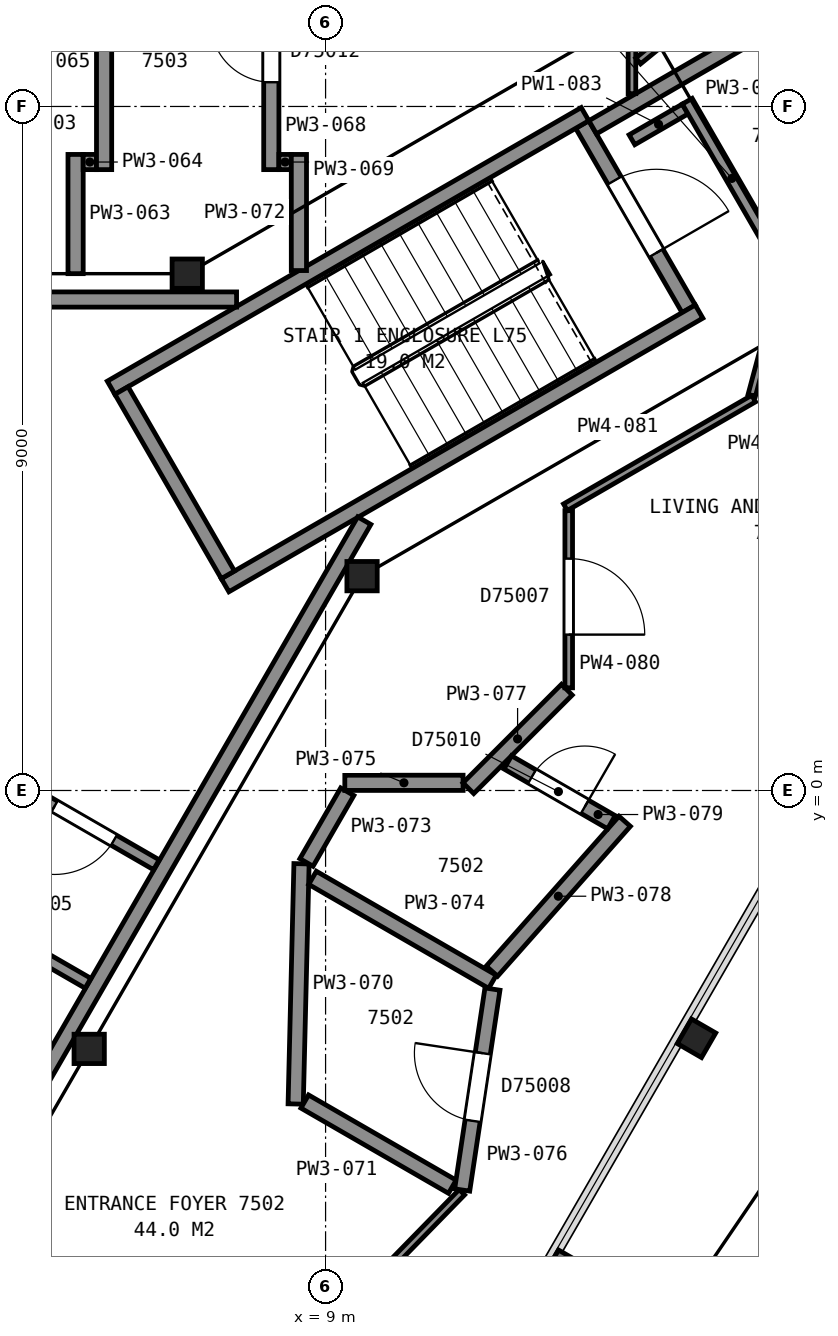
"""IFC4 building model, lengths in metres.
Left out: names, types, materials, properties, quantities, classifications, styles, units other than length and angle.
Written with IfcOpenShell. Run it as: python <this file> out.ifc"""

import sys

from ifc_helpers import new_model, si_unit, direction, frame, frame_2d, origin, origin_2d, place, context, subcontext, project, spatial, rectangle, i_section, extrude, element, fill, save


model = new_model("IFC4")
c1 = context("Model", 3, precision=1e-05, world=origin(), true_north=direction((0.0, 1.0)))
c2 = subcontext(c1, "Body", "Model", "MODEL_VIEW")
j1 = project(units=[si_unit("LENGTHUNIT", "METRE"), si_unit("PLANEANGLEUNIT", "RADIAN")], contexts=[c1])
p1 = place(None, origin())
s1 = spatial("IfcSite", under=j1, at=p1, CompositionType="ELEMENT")
p2 = place(p1, origin())
s2 = spatial("IfcBuilding", under=s1, at=p2, CompositionType="ELEMENT")
p3 = place(p2, frame((0.0, 0.0, 297.3)))
s3 = spatial("IfcBuildingStorey", under=s2, at=p3, CompositionType="ELEMENT", Elevation=297.3)
p4 = place(p3, frame((13.88, -3.26, 0.0), z_axis=(0.0, 0.0, 1.0), x_axis=(-0.5, -0.866025403784, 0.0)))
e1 = element("IfcColumn", 1, at=p4, inside=s3, PredefinedType="COLUMN", context=c2, shape_type="SweptSolid", body=[
    extrude(i_section(OverallWidth=0.373, OverallDepth=0.368, WebThickness=0.015, FlangeThickness=0.024, FilletRadius=0.015, at=origin_2d()), origin(), (0.0, 0.0, 1.0), 3.7),
])
for number, where, z_axis, x_axis in (
    (2, (9.48, 2.82, 0.0), (0.0, 0.0, 1.0), (1.0, 0.0, 0.0)),
    (3, (7.18, 6.8, 0.0), (0.0, 0.0, 1.0), (1.0, 0.0, 0.0)),
    (4, (5.89, -3.4, 0.0), (0.0, 0.0, 1.0), (1.0, 0.0, 0.0)),
):
    element("IfcColumn", number, at=place(p3, frame(where, z_axis=z_axis, x_axis=x_axis)), inside=s3, PredefinedType="COLUMN", context=c2, shape_type="SweptSolid", body=[
        extrude(i_section(OverallWidth=0.399, OverallDepth=0.386, WebThickness=0.021, FlangeThickness=0.033, FilletRadius=0.015, at=origin_2d()), origin(), (0.0, 0.0, 1.0), 3.7),
    ])
p5 = place(p3, frame((13.777, 6.338, 0.0), z_axis=(0.0, 0.0, 1.0), x_axis=(-0.500049511043, 0.865996816683, 0.0)))
e5 = element("IfcWall", 5, at=p5, inside=s3, PredefinedType="PARTITIONING", context=c2, shape_type="SweptSolid", body=[
    extrude(rectangle(XDim=2.8, YDim=0.2, at=frame_2d((1.4, 0.0))), origin(), (0.0, 0.0, 1.0), 3.45),
])
p6 = place(p5, frame((0.85, 0.0, 0.0)))
e6 = element("IfcOpeningElement", 6, at=p6, cuts=e5, PredefinedType="OPENING", context=c2, shape_type="SweptSolid", body=[
    extrude(rectangle(XDim=1.1, YDim=2.1, at=frame_2d((0.55, 1.05))), frame((0.0, 0.11, 0.0), z_axis=(0.0, -1.0, 0.0), x_axis=(1.0, 0.0, 0.0)), (0.0, 0.0, 1.0), 0.22),
])
for number, where, z_axis, x_axis in (
    (7, (6.178, 5.299, 0.0), (0.0, 0.0, 1.0), (0.866, 0.5, 0.0)),
    (8, (7.678, 2.701, 0.0), (0.0, 0.0, 1.0), (0.866, 0.5, 0.0)),
):
    element("IfcWall", number, at=place(p3, frame(where, z_axis=z_axis, x_axis=x_axis)), inside=s3, PredefinedType="PARTITIONING", context=c2, shape_type="SweptSolid", body=[
        extrude(rectangle(XDim=7.2, YDim=0.2, at=frame_2d((3.6, 0.0))), origin(), (0.0, 0.0, 1.0), 3.45),
    ])
p7 = place(p3, frame((7.715, 2.838, 0.0), z_axis=(0.0, 0.0, 1.0), x_axis=(-0.500049511043, 0.865996816683, 0.0)))
e9 = element("IfcWall", 9, at=p7, inside=s3, PredefinedType="PARTITIONING", context=c2, shape_type="SweptSolid", body=[
    extrude(rectangle(XDim=2.8, YDim=0.2, at=frame_2d((1.4, 0.0))), origin(), (0.0, 0.0, 1.0), 3.45),
])
p8 = place(p3, frame((7.829, 6.46, 0.0), z_axis=(0.0, 0.0, 1.0), x_axis=(-1.0, 0.0, 0.0)))
e10 = element("IfcWall", 10, at=p8, inside=s3, PredefinedType="PARTITIONING", context=c2, shape_type="SweptSolid", body=[
    extrude(rectangle(XDim=15.658, YDim=0.2, at=frame_2d((7.829, 0.0))), origin(), (0.0, 0.0, 1.0), 3.45),
])
p9 = place(p8, frame((12.168, 0.0, 0.0)))
e11 = element("IfcOpeningElement", 11, at=p9, cuts=e10, PredefinedType="OPENING", context=c2, shape_type="SweptSolid", body=[
    extrude(rectangle(XDim=1.2, YDim=2.1, at=frame_2d((0.6, 1.05))), frame((0.0, 0.11, 0.0), z_axis=(0.0, -1.0, 0.0), x_axis=(1.0, 0.0, 0.0)), (0.0, 0.0, 1.0), 0.22),
])
p10 = place(p3, frame((3.828, -6.29, 0.0), z_axis=(0.0, 0.0, 1.0), x_axis=(0.499979739078, 0.866037101117, 0.0)))
e12 = element("IfcWall", 12, at=p10, inside=s3, PredefinedType="PARTITIONING", context=c2, shape_type="SweptSolid", body=[
    extrude(rectangle(XDim=11.363, YDim=0.2, at=frame_2d((5.681, 0.0))), origin(), (0.0, 0.0, 1.0), 3.45),
])
p11 = place(p10, frame((0.55, 0.0, 0.0)))
e13 = element("IfcOpeningElement", 13, at=p11, cuts=e12, PredefinedType="OPENING", context=c2, shape_type="SweptSolid", body=[
    extrude(rectangle(XDim=1.2, YDim=2.1, at=frame_2d((0.6, 1.05))), frame((0.0, 0.11, 0.0), z_axis=(0.0, -1.0, 0.0), x_axis=(1.0, 0.0, 0.0)), (0.0, 0.0, 1.0), 0.22),
])
p12 = place(p3, frame((3.951, -1.427, 0.0), z_axis=(0.0, 0.0, 1.0), x_axis=(0.866062920605, -0.499935013329, 0.0)))
e14 = element("IfcWall", 14, at=p12, inside=s3, PredefinedType="PARTITIONING", context=c2, shape_type="SweptSolid", body=[
    extrude(rectangle(XDim=2.22, YDim=0.15, at=frame_2d((1.11, 0.0))), origin(), (0.0, 0.0, 1.0), 3.45),
])
p13 = place(p3, frame((6.774, -0.978, 0.0), z_axis=(0.0, 0.0, 1.0), x_axis=(-0.866062920605, 0.499935013329, 0.0)))
e15 = element("IfcWall", 15, at=p13, inside=s3, PredefinedType="PARTITIONING", context=c2, shape_type="SweptSolid", body=[
    extrude(rectangle(XDim=2.22, YDim=0.15, at=frame_2d((1.11, 0.0))), origin(), (0.0, 0.0, 1.0), 3.45),
])
p14 = place(p13, frame((0.646, 0.0, 0.0)))
e16 = element("IfcOpeningElement", 16, at=p14, cuts=e15, PredefinedType="OPENING", context=c2, shape_type="SweptSolid", body=[
    extrude(rectangle(XDim=0.9, YDim=2.1, at=frame_2d((0.45, 1.05))), frame((0.0, 0.085, 0.0), z_axis=(0.0, -1.0, 0.0), x_axis=(1.0, 0.0, 0.0)), (0.0, 0.0, 1.0), 0.17),
])
p15 = place(p3, frame((6.175, 11.216, 0.0), z_axis=(0.0, 0.0, 1.0), x_axis=(-0.885512941371, -0.464614712062, 0.0)))
e17 = element("IfcWall", 17, at=p15, inside=s3, PredefinedType="PARTITIONING", context=c2, shape_type="SweptSolid", body=[
    extrude(rectangle(XDim=3.362, YDim=0.2, at=frame_2d((1.681, 0.0))), origin(), (0.0, 0.0, 1.0), 2.723),
])
p16 = place(p15, frame((1.212, 0.0, 0.0)))
e18 = element("IfcOpeningElement", 18, at=p16, cuts=e17, PredefinedType="OPENING", context=c2, shape_type="SweptSolid", body=[
    extrude(rectangle(XDim=0.9, YDim=2.1, at=frame_2d((0.45, 1.05))), frame((0.0, 0.11, 0.0), z_axis=(0.0, -1.0, 0.0), x_axis=(1.0, 0.0, 0.0)), (0.0, 0.0, 1.0), 0.22),
])
p17 = place(p3, frame((5.711, 6.8, 0.0), z_axis=(0.0, 0.0, 1.0), x_axis=(0.0, 1.0, 0.0)))
e19 = element("IfcWall", 19, at=p17, inside=s3, PredefinedType="PARTITIONING", context=c2, shape_type="SweptSolid", body=[
    extrude(rectangle(XDim=1.569, YDim=0.2, at=frame_2d((0.784, 0.0))), origin(), (0.0, 0.0, 1.0), 2.723),
])
p18 = place(p3, frame((5.811, 8.269, 0.0), z_axis=(0.0, 0.0, 1.0), x_axis=(1.0, 0.0, 0.0)))
e20 = element("IfcWall", 20, at=p18, inside=s3, PredefinedType="PARTITIONING", context=c2, shape_type="SweptSolid", body=[
    extrude(rectangle(XDim=0.175, YDim=0.2, at=frame_2d((0.087, 0.0))), origin(), (0.0, 0.0, 1.0), 2.723),
])
p19 = place(p3, frame((6.086, 8.169, 0.0), z_axis=(0.0, 0.0, 1.0), x_axis=(0.0, 1.0, 0.0)))
e21 = element("IfcWall", 21, at=p19, inside=s3, PredefinedType="PARTITIONING", context=c2, shape_type="SweptSolid", body=[
    extrude(rectangle(XDim=2.835, YDim=0.2, at=frame_2d((1.417, 0.0))), origin(), (0.0, 0.0, 1.0), 2.723),
])
p20 = place(p3, frame((7.682, -8.47, 0.0), z_axis=(0.0, 0.0, 1.0), x_axis=(0.698777378461, 0.715339203002, 0.0)))
e22 = element("IfcWall", 22, at=p20, inside=s3, PredefinedType="PARTITIONING", context=c2, shape_type="SweptSolid", body=[
    extrude(rectangle(XDim=4.452, YDim=0.1, at=frame_2d((2.226, 0.0))), origin(), (0.0, 0.0, 1.0), 2.723),
])
p21 = place(p3, frame((8.286, 8.169, 0.0), z_axis=(0.0, 0.0, 1.0), x_axis=(0.0, 1.0, 0.0)))
e23 = element("IfcWall", 23, at=p21, inside=s3, PredefinedType="PARTITIONING", context=c2, shape_type="SweptSolid", body=[
    extrude(rectangle(XDim=3.1, YDim=0.2, at=frame_2d((1.55, 0.0))), origin(), (0.0, 0.0, 1.0), 2.723),
])
p22 = place(p21, frame((1.15, 0.0, 0.0)))
e24 = element("IfcOpeningElement", 24, at=p22, cuts=e23, PredefinedType="OPENING", context=c2, shape_type="SweptSolid", body=[
    extrude(rectangle(XDim=0.8, YDim=2.1, at=frame_2d((0.4, 1.05))), frame((0.0, 0.11, 0.0), z_axis=(0.0, -1.0, 0.0), x_axis=(1.0, 0.0, 0.0)), (0.0, 0.0, 1.0), 0.22),
])
p23 = place(p3, frame((8.386, 8.269, 0.0), z_axis=(0.0, 0.0, 1.0), x_axis=(1.0, 0.0, 0.0)))
e25 = element("IfcWall", 25, at=p23, inside=s3, PredefinedType="PARTITIONING", context=c2, shape_type="SweptSolid", body=[
    extrude(rectangle(XDim=0.163, YDim=0.2, at=frame_2d((0.082, 0.0))), origin(), (0.0, 0.0, 1.0), 2.723),
])
p24 = place(p3, frame((8.607, -4.125, 0.0), z_axis=(0.0, 0.0, 1.0), x_axis=(0.024245593124, 0.999706032399, 0.0)))
e26 = element("IfcWall", 26, at=p24, inside=s3, PredefinedType="PARTITIONING", context=c2, shape_type="SweptSolid", body=[
    extrude(rectangle(XDim=3.162, YDim=0.2, at=frame_2d((1.581, 0.0))), origin(), (0.0, 0.0, 1.0), 2.723),
])
p25 = place(p3, frame((8.726, -4.093, 0.0), z_axis=(0.0, 0.0, 1.0), x_axis=(0.866056839033, -0.499945548598, 0.0)))
e27 = element("IfcWall", 27, at=p25, inside=s3, PredefinedType="PARTITIONING", context=c2, shape_type="SweptSolid", body=[
    extrude(rectangle(XDim=2.242, YDim=0.2, at=frame_2d((1.121, 0.0))), origin(), (0.0, 0.0, 1.0), 2.723),
])
p26 = place(p3, frame((8.649, 6.841, 0.0), z_axis=(0.0, 0.0, 1.0), x_axis=(0.0, 1.0, 0.0)))
e28 = element("IfcWall", 28, at=p26, inside=s3, PredefinedType="PARTITIONING", context=c2, shape_type="SweptSolid", body=[
    extrude(rectangle(XDim=1.528, YDim=0.2, at=frame_2d((0.764, 0.0))), origin(), (0.0, 0.0, 1.0), 2.723),
])
p27 = place(p3, frame((8.749, -0.947, 0.0), z_axis=(0.0, 0.0, 1.0), x_axis=(0.499656913366, 0.866223394354, 0.0)))
e29 = element("IfcWall", 29, at=p27, inside=s3, PredefinedType="PARTITIONING", context=c2, shape_type="SweptSolid", body=[
    extrude(rectangle(XDim=1.075, YDim=0.2, at=frame_2d((0.538, 0.0))), origin(), (0.0, 0.0, 1.0), 2.723),
])
p28 = place(p3, frame((8.828, -1.149, 0.0), z_axis=(0.0, 0.0, 1.0), x_axis=(0.865853899269, -0.50029693695, 0.0)))
e30 = element("IfcWall", 30, at=p28, inside=s3, PredefinedType="PARTITIONING", context=c2, shape_type="SweptSolid", body=[
    extrude(rectangle(XDim=2.734, YDim=0.2, at=frame_2d((1.367, 0.0))), origin(), (0.0, 0.0, 1.0), 2.723),
])
p29 = place(p3, frame((9.253, 0.101, 0.0), z_axis=(0.0, 0.0, 1.0), x_axis=(1.0, 0.0, 0.0)))
e31 = element("IfcWall", 31, at=p29, inside=s3, PredefinedType="PARTITIONING", context=c2, shape_type="SweptSolid", body=[
    extrude(rectangle(XDim=1.556, YDim=0.2, at=frame_2d((0.778, 0.0))), origin(), (0.0, 0.0, 1.0), 2.723),
])
p30 = place(p3, frame((10.797, -5.256, 0.0), z_axis=(0.0, 0.0, 1.0), x_axis=(0.148961207986, 0.988843040384, 0.0)))
e32 = element("IfcWall", 32, at=p30, inside=s3, PredefinedType="PARTITIONING", context=c2, shape_type="SweptSolid", body=[
    extrude(rectangle(XDim=2.673, YDim=0.2, at=frame_2d((1.336, 0.0))), origin(), (0.0, 0.0, 1.0), 2.723),
])
p31 = place(p30, frame((0.92, 0.0, 0.0)))
e33 = element("IfcOpeningElement", 33, at=p31, cuts=e32, PredefinedType="OPENING", context=c2, shape_type="SweptSolid", body=[
    extrude(rectangle(XDim=0.9, YDim=2.1, at=frame_2d((0.45, 1.05))), frame((0.0, 0.11, 0.0), z_axis=(0.0, -1.0, 0.0), x_axis=(1.0, 0.0, 0.0)), (0.0, 0.0, 1.0), 0.22),
])
p32 = place(p3, frame((10.878, 0.03, 0.0), z_axis=(0.0, 0.0, 1.0), x_axis=(0.707173379423, 0.707040176677, 0.0)))
e34 = element("IfcWall", 34, at=p32, inside=s3, PredefinedType="PARTITIONING", context=c2, shape_type="SweptSolid", body=[
    extrude(rectangle(XDim=1.833, YDim=0.2, at=frame_2d((0.917, 0.0))), origin(), (0.0, 0.0, 1.0), 2.723),
])
p33 = place(p3, frame((11.188, -2.377, 0.0), z_axis=(0.0, 0.0, 1.0), x_axis=(0.663045631266, 0.748578981043, 0.0)))
e35 = element("IfcWall", 35, at=p33, inside=s3, PredefinedType="PARTITIONING", context=c2, shape_type="SweptSolid", body=[
    extrude(rectangle(XDim=2.635, YDim=0.2, at=frame_2d((1.317, 0.0))), origin(), (0.0, 0.0, 1.0), 2.723),
])
p34 = place(p3, frame((12.761, -0.417, 0.0), z_axis=(0.0, 0.0, 1.0), x_axis=(-0.866030680601, 0.499990860175, 0.0)))
e36 = element("IfcWall", 36, at=p34, inside=s3, PredefinedType="PARTITIONING", context=c2, shape_type="SweptSolid", body=[
    extrude(rectangle(XDim=1.575, YDim=0.2, at=frame_2d((0.787, 0.0))), origin(), (0.0, 0.0, 1.0), 2.723),
])
p35 = place(p34, frame((0.405, 0.0, 0.0)))
e37 = element("IfcOpeningElement", 37, at=p35, cuts=e36, PredefinedType="OPENING", context=c2, shape_type="SweptSolid", body=[
    extrude(rectangle(XDim=0.8, YDim=2.1, at=frame_2d((0.4, 1.05))), frame((0.0, 0.11, 0.0), z_axis=(0.0, -1.0, 0.0), x_axis=(1.0, 0.0, 0.0)), (0.0, 0.0, 1.0), 0.22),
])
p36 = place(p3, frame((12.199, 3.682, 0.0), z_axis=(0.0, 0.0, 1.0), x_axis=(0.0, -1.0, 0.0)))
e38 = element("IfcWall", 38, at=p36, inside=s3, PredefinedType="PARTITIONING", context=c2, shape_type="SweptSolid", body=[
    extrude(rectangle(XDim=2.331, YDim=0.1, at=frame_2d((1.166, 0.0))), origin(), (0.0, 0.0, 1.0), 2.723),
])
p37 = place(p36, frame((0.631, 0.0, 0.0)))
e39 = element("IfcOpeningElement", 39, at=p37, cuts=e38, PredefinedType="OPENING", context=c2, shape_type="SweptSolid", body=[
    extrude(rectangle(XDim=1.0, YDim=2.1, at=frame_2d((0.5, 1.05))), frame((0.0, 0.06, 0.0), z_axis=(0.0, -1.0, 0.0), x_axis=(1.0, 0.0, 0.0)), (0.0, 0.0, 1.0), 0.12),
])
p38 = place(p3, frame((12.156, 3.727, 0.0), z_axis=(0.0, 0.0, 1.0), x_axis=(0.866012137121, 0.500022977831, 0.0)))
e40 = element("IfcWall", 40, at=p38, inside=s3, PredefinedType="PARTITIONING", context=c2, shape_type="SweptSolid", body=[
    extrude(rectangle(XDim=2.86, YDim=0.1, at=frame_2d((1.43, 0.0))), origin(), (0.0, 0.0, 1.0), 2.723),
])
p39 = place(p3, frame((12.514, 8.726, 0.0), z_axis=(0.0, 0.0, 1.0), x_axis=(0.865969617579, 0.500096612097, 0.0)))
e41 = element("IfcWall", 41, at=p39, inside=s3, PredefinedType="PARTITIONING", context=c2, shape_type="SweptSolid", body=[
    extrude(rectangle(XDim=2.899, YDim=0.2, at=frame_2d((1.45, 0.0))), origin(), (0.0, 0.0, 1.0), 2.723),
])
p40 = place(p3, frame((13.031, 8.562, 0.0), z_axis=(0.0, 0.0, 1.0), x_axis=(0.865798205633, 0.500393312429, 0.0)))
e42 = element("IfcWall", 42, at=p40, inside=s3, PredefinedType="PARTITIONING", context=c2, shape_type="SweptSolid", body=[
    extrude(rectangle(XDim=0.808, YDim=0.15, at=frame_2d((0.404, 0.0))), origin(), (0.0, 0.0, 1.0), 2.723),
])
p41 = place(p3, frame((13.031, 13.351, 0.0), z_axis=(0.0, 0.0, 1.0), x_axis=(0.0, -1.0, 0.0)))
e43 = element("IfcWall", 43, at=p41, inside=s3, PredefinedType="PARTITIONING", context=c2, shape_type="SweptSolid", body=[
    extrude(rectangle(XDim=4.183, YDim=0.1, at=frame_2d((2.091, 0.0))), origin(), (0.0, 0.0, 1.0), 2.723),
])
p42 = place(p41, frame((1.469, 0.0, 0.0)))
e44 = element("IfcOpeningElement", 44, at=p42, cuts=e43, PredefinedType="OPENING", context=c2, shape_type="SweptSolid", body=[
    extrude(rectangle(XDim=0.9, YDim=2.1, at=frame_2d((0.45, 1.05))), frame((0.0, 0.06, 0.0), z_axis=(0.0, -1.0, 0.0), x_axis=(1.0, 0.0, 0.0)), (0.0, 0.0, 1.0), 0.12),
])
p43 = place(p3, frame((17.733, 13.38, 0.0), z_axis=(0.0, 0.0, 1.0), x_axis=(-0.773858908961, -0.633358025939, 0.0)))
e45 = element("IfcWall", 45, at=p43, inside=s3, PredefinedType="PARTITIONING", context=c2, shape_type="SweptSolid", body=[
    extrude(rectangle(XDim=5.97, YDim=0.1, at=frame_2d((2.985, 0.0))), origin(), (0.0, 0.0, 1.0), 2.723),
])
p44 = place(p43, frame((2.626, 0.0, 0.0)))
e46 = element("IfcOpeningElement", 46, at=p44, cuts=e45, PredefinedType="OPENING", context=c2, shape_type="SweptSolid", body=[
    extrude(rectangle(XDim=1.0, YDim=2.1, at=frame_2d((0.5, 1.05))), frame((0.0, 0.06, 0.0), z_axis=(0.0, -1.0, 0.0), x_axis=(1.0, 0.0, 0.0)), (0.0, 0.0, 1.0), 0.12),
])
p45 = place(p3, frame((13.759, 9.069, 0.0), z_axis=(0.0, 0.0, 1.0), x_axis=(0.500046885369, -0.865998332812, 0.0)))
e47 = element("IfcWall", 47, at=p45, inside=s3, PredefinedType="PARTITIONING", context=c2, shape_type="SweptSolid", body=[
    extrude(rectangle(XDim=2.345, YDim=0.15, at=frame_2d((1.172, 0.0))), origin(), (0.0, 0.0, 1.0), 2.723),
])
p46 = place(p3, frame((14.607, 5.2, 0.0), z_axis=(0.0, 0.0, 1.0), x_axis=(0.258519214507, 0.966006115783, 0.0)))
e48 = element("IfcWall", 48, at=p46, inside=s3, PredefinedType="PARTITIONING", context=c2, shape_type="SweptSolid", body=[
    extrude(rectangle(XDim=1.632, YDim=0.1, at=frame_2d((0.816, 0.0))), origin(), (0.0, 0.0, 1.0), 2.723),
])
p47 = place(p6, origin())
e49 = element("IfcDoor", 49, at=p47, inside=s3, OperationType="SINGLE_SWING_LEFT", PredefinedType="DOOR", context=c2, shape_type="SweptSolid", body=[
    extrude(rectangle(XDim=1.1, YDim=2.1, at=frame_2d((0.55, 1.05))), frame((0.0, 0.025, 0.0), z_axis=(0.0, -1.0, 0.0), x_axis=(1.0, 0.0, 0.0)), (0.0, 0.0, 1.0), 0.05),
])
fill(e6, e49)
p48 = place(p14, origin())
e50 = element("IfcDoor", 50, at=p48, inside=s3, OperationType="SINGLE_SWING_RIGHT", PredefinedType="DOOR", context=c2, shape_type="SweptSolid", body=[
    extrude(rectangle(XDim=0.9, YDim=2.1, at=frame_2d((0.45, 1.05))), frame((0.0, 0.025, 0.0), z_axis=(0.0, -1.0, 0.0), x_axis=(1.0, 0.0, 0.0)), (0.0, 0.0, 1.0), 0.05),
])
fill(e16, e50)
p49 = place(p22, origin())
e51 = element("IfcDoor", 51, at=p49, inside=s3, OperationType="SINGLE_SWING_RIGHT", PredefinedType="DOOR", context=c2, shape_type="SweptSolid", body=[
    extrude(rectangle(XDim=0.8, YDim=2.1, at=frame_2d((0.4, 1.05))), frame((0.0, 0.025, 0.0), z_axis=(0.0, -1.0, 0.0), x_axis=(1.0, 0.0, 0.0)), (0.0, 0.0, 1.0), 0.05),
])
fill(e24, e51)
p50 = place(p31, origin())
e52 = element("IfcDoor", 52, at=p50, inside=s3, OperationType="SINGLE_SWING_RIGHT", PredefinedType="DOOR", context=c2, shape_type="SweptSolid", body=[
    extrude(rectangle(XDim=0.9, YDim=2.1, at=frame_2d((0.45, 1.05))), frame((0.0, 0.025, 0.0), z_axis=(0.0, -1.0, 0.0), x_axis=(1.0, 0.0, 0.0)), (0.0, 0.0, 1.0), 0.05),
])
fill(e33, e52)
p51 = place(p35, origin())
e53 = element("IfcDoor", 53, at=p51, inside=s3, OperationType="SINGLE_SWING_LEFT", PredefinedType="DOOR", context=c2, shape_type="SweptSolid", body=[
    extrude(rectangle(XDim=0.8, YDim=2.1, at=frame_2d((0.4, 1.05))), frame((0.0, 0.025, 0.0), z_axis=(0.0, -1.0, 0.0), x_axis=(1.0, 0.0, 0.0)), (0.0, 0.0, 1.0), 0.05),
])
fill(e37, e53)
p52 = place(p37, origin())
e54 = element("IfcDoor", 54, at=p52, inside=s3, OperationType="SINGLE_SWING_RIGHT", PredefinedType="DOOR", context=c2, shape_type="SweptSolid", body=[
    extrude(rectangle(XDim=1.0, YDim=2.1, at=frame_2d((0.5, 1.05))), frame((0.0, 0.025, 0.0), z_axis=(0.0, -1.0, 0.0), x_axis=(1.0, 0.0, 0.0)), (0.0, 0.0, 1.0), 0.05),
])
fill(e39, e54)
save(model, sys.argv[1])
